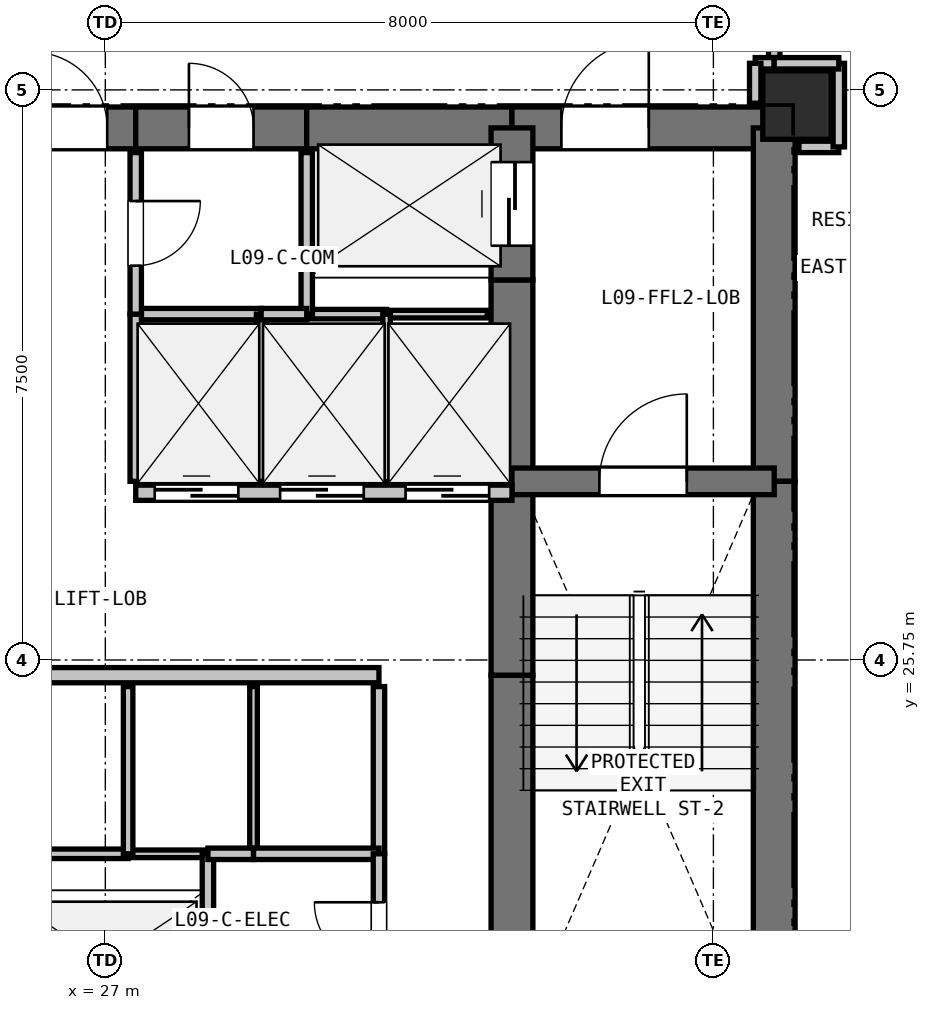
"""IFC4 building model, lengths in metres.
Left out: names, types, materials, properties, quantities, classifications, styles, units other than length and angle.
Written with IfcOpenShell. Run it as: python <this file> out.ifc"""

import sys

from ifc_helpers import new_model, si_unit, direction, frame, frame_2d, origin, origin_2d, place, context, subcontext, project, spatial, rectangle, extrude, element, fill, save


model = new_model("IFC4")
c1 = context("Model", 3, precision=1e-05, world=origin(), true_north=direction((0.0, 1.0)))
c2 = subcontext(c1, "Body", "Model", "MODEL_VIEW")
j1 = project(units=[si_unit("LENGTHUNIT", "METRE"), si_unit("PLANEANGLEUNIT", "RADIAN")], contexts=[c1])
p1 = place(None, origin())
s1 = spatial("IfcSite", under=j1, at=p1, CompositionType="ELEMENT")
p2 = place(p1, origin())
s2 = spatial("IfcBuilding", under=s1, at=p2, CompositionType="ELEMENT")
p3 = place(p2, frame((0.0, 0.0, 35.7)))
s3 = spatial("IfcBuildingStorey", under=s2, at=p3, CompositionType="ELEMENT", Elevation=35.7)
p4 = place(p3, frame((36.1, 33.05, 0.0), z_axis=(0.0, 0.0, 1.0), x_axis=(1.0, 0.0, 0.0)))
e1 = element("IfcColumn", 1, at=p4, inside=s3, PredefinedType="COLUMN", context=c2, shape_type="SweptSolid", body=[
    extrude(rectangle(XDim=0.9, YDim=0.9, at=origin_2d()), origin(), (0.0, 0.0, 1.0), 3.3),
])
p5 = place(p3, frame((25.65, 32.75, 0.0), z_axis=(0.0, 0.0, 1.0), x_axis=(1.0, 0.0, 0.0)))
e2 = element("IfcWall", 2, at=p5, inside=s3, PredefinedType="SHEAR", context=c2, shape_type="SweptSolid", body=[
    extrude(rectangle(XDim=1.75, YDim=0.55, at=frame_2d((0.875, 0.0))), origin(), (0.0, 0.0, 1.0), 3.04),
])
p6 = place(p5, frame((0.375, 0.0, 0.0)))
e3 = element("IfcOpeningElement", 3, at=p6, cuts=e2, PredefinedType="OPENING", context=c2, shape_type="SweptSolid", body=[
    extrude(rectangle(XDim=1.0, YDim=2.15, at=frame_2d((0.5, 1.075))), frame((0.0, 0.285, 0.0), z_axis=(0.0, -1.0, 0.0), x_axis=(1.0, 0.0, 0.0)), (0.0, 0.0, 1.0), 0.57),
])
p7 = place(p3, frame((27.4, 32.75, 0.0), z_axis=(0.0, 0.0, 1.0), x_axis=(1.0, 0.0, 0.0)))
e4 = element("IfcWall", 4, at=p7, inside=s3, PredefinedType="SHEAR", context=c2, shape_type="SweptSolid", body=[
    extrude(rectangle(XDim=2.25, YDim=0.55, at=frame_2d((1.125, 0.0))), origin(), (0.0, 0.0, 1.0), 3.04),
])
p8 = place(p7, frame((0.7, 0.0, 0.0)))
e5 = element("IfcOpeningElement", 5, at=p8, cuts=e4, PredefinedType="OPENING", context=c2, shape_type="SweptSolid", body=[
    extrude(rectangle(XDim=0.85, YDim=2.1, at=frame_2d((0.425, 1.05))), frame((0.0, 0.285, 0.0), z_axis=(0.0, -1.0, 0.0), x_axis=(1.0, 0.0, 0.0)), (0.0, 0.0, 1.0), 0.57),
])
p9 = place(p3, frame((29.65, 32.75, 0.0), z_axis=(0.0, 0.0, 1.0), x_axis=(1.0, 0.0, 0.0)))
e6 = element("IfcWall", 6, at=p9, inside=s3, PredefinedType="SHEAR", context=c2, shape_type="SweptSolid", body=[
    extrude(rectangle(XDim=2.7, YDim=0.55, at=frame_2d((1.35, 0.0))), origin(), (0.0, 0.0, 1.0), 3.04),
])
p10 = place(p3, frame((32.35, 32.75, 0.0), z_axis=(0.0, 0.0, 1.0), x_axis=(1.0, 0.0, 0.0)))
e7 = element("IfcWall", 7, at=p10, inside=s3, PredefinedType="SHEAR", context=c2, shape_type="SweptSolid", body=[
    extrude(rectangle(XDim=3.45, YDim=0.55, at=frame_2d((1.725, 0.0))), origin(), (0.0, 0.0, 1.0), 3.04),
])
p11 = place(p10, frame((0.65, 0.0, 0.0)))
e8 = element("IfcOpeningElement", 8, at=p11, cuts=e7, PredefinedType="OPENING", context=c2, shape_type="SweptSolid", body=[
    extrude(rectangle(XDim=1.15, YDim=2.15, at=frame_2d((0.575, 1.075))), frame((0.0, 0.285, 0.0), z_axis=(0.0, -1.0, 0.0), x_axis=(1.0, 0.0, 0.0)), (0.0, 0.0, 1.0), 0.57),
])
p12 = place(p3, frame((35.8, 32.75, 0.0), z_axis=(0.0, 0.0, 1.0), x_axis=(0.0, -1.0, 0.0)))
e9 = element("IfcWall", 9, at=p12, inside=s3, PredefinedType="SHEAR", context=c2, shape_type="SweptSolid", body=[
    extrude(rectangle(XDim=4.65, YDim=0.55, at=frame_2d((2.325, 0.0))), origin(), (0.0, 0.0, 1.0), 3.04),
])
p13 = place(p3, frame((35.8, 28.1, 0.0), z_axis=(0.0, 0.0, 1.0), x_axis=(0.0, -1.0, 0.0)))
e10 = element("IfcWall", 10, at=p13, inside=s3, PredefinedType="SHEAR", context=c2, shape_type="SweptSolid", body=[
    extrude(rectangle(XDim=7.35, YDim=0.55, at=frame_2d((3.675, 0.0))), origin(), (0.0, 0.0, 1.0), 3.04),
])
p14 = place(p3, frame((32.35, 20.75, 0.0), z_axis=(0.0, 0.0, 1.0), x_axis=(0.0, 1.0, 0.0)))
e11 = element("IfcWall", 11, at=p14, inside=s3, PredefinedType="SHEAR", context=c2, shape_type="SweptSolid", body=[
    extrude(rectangle(XDim=4.8, YDim=0.55, at=frame_2d((2.4, 0.0))), origin(), (0.0, 0.0, 1.0), 3.04),
])
p15 = place(p3, frame((32.35, 25.55, 0.0), z_axis=(0.0, 0.0, 1.0), x_axis=(0.0, 1.0, 0.0)))
e12 = element("IfcWall", 12, at=p15, inside=s3, PredefinedType="SHEAR", context=c2, shape_type="SweptSolid", body=[
    extrude(rectangle(XDim=2.4, YDim=0.55, at=frame_2d((1.2, 0.0))), origin(), (0.0, 0.0, 1.0), 3.04),
])
p16 = place(p3, frame((32.35, 27.95, 0.0), z_axis=(0.0, 0.0, 1.0), x_axis=(0.0, 1.0, 0.0)))
e13 = element("IfcWall", 13, at=p16, inside=s3, PredefinedType="SHEAR", context=c2, shape_type="SweptSolid", body=[
    extrude(rectangle(XDim=2.8, YDim=0.55, at=frame_2d((1.4, 0.0))), origin(), (0.0, 0.0, 1.0), 3.04),
])
p17 = place(p3, frame((32.35, 30.75, 0.0), z_axis=(0.0, 0.0, 1.0), x_axis=(0.0, 1.0, 0.0)))
e14 = element("IfcWall", 14, at=p17, inside=s3, PredefinedType="SHEAR", context=c2, shape_type="SweptSolid", body=[
    extrude(rectangle(XDim=2.0, YDim=0.55, at=frame_2d((1.0, 0.0))), origin(), (0.0, 0.0, 1.0), 3.04),
])
p18 = place(p17, frame((0.45, 0.0, 0.0)))
e15 = element("IfcOpeningElement", 15, at=p18, cuts=e14, PredefinedType="OPENING", context=c2, shape_type="SweptSolid", body=[
    extrude(rectangle(XDim=1.1, YDim=2.15, at=frame_2d((0.55, 1.075))), frame((0.0, 0.285, 0.0), z_axis=(0.0, -1.0, 0.0), x_axis=(1.0, 0.0, 0.0)), (0.0, 0.0, 1.0), 0.57),
])
p19 = place(p3, frame((32.35, 28.1, 0.0), z_axis=(0.0, 0.0, 1.0), x_axis=(1.0, 0.0, 0.0)))
e16 = element("IfcWall", 16, at=p19, inside=s3, PredefinedType="SHEAR", context=c2, shape_type="SweptSolid", body=[
    extrude(rectangle(XDim=3.45, YDim=0.35, at=frame_2d((1.725, 0.0))), origin(), (0.0, 0.0, 1.0), 3.04),
])
p20 = place(p19, frame((1.15, 0.0, 0.0)))
e17 = element("IfcOpeningElement", 17, at=p20, cuts=e16, PredefinedType="OPENING", context=c2, shape_type="SweptSolid", body=[
    extrude(rectangle(XDim=1.15, YDim=2.15, at=frame_2d((0.575, 1.075))), frame((0.0, 0.185, 0.0), z_axis=(0.0, -1.0, 0.0), x_axis=(1.0, 0.0, 0.0)), (0.0, 0.0, 1.0), 0.37),
])
p21 = place(p3, frame((25.65, 25.55, 0.0), z_axis=(0.0, 0.0, 1.0), x_axis=(1.0, 0.0, 0.0)))
e18 = element("IfcWall", 18, at=p21, inside=s3, PredefinedType="PARTITIONING", context=c2, shape_type="SweptSolid", body=[
    extrude(rectangle(XDim=4.95, YDim=0.2, at=frame_2d((2.475, 0.0))), origin(), (0.0, 0.0, 1.0), 3.04),
])
p22 = place(p3, frame((27.4, 27.95, 0.0), z_axis=(0.0, 0.0, 1.0), x_axis=(1.0, 0.0, 0.0)))
e19 = element("IfcWall", 19, at=p22, inside=s3, PredefinedType="PARTITIONING", context=c2, shape_type="SweptSolid", body=[
    extrude(rectangle(XDim=4.95, YDim=0.2, at=frame_2d((2.475, 0.0))), origin(), (0.0, 0.0, 1.0), 3.04),
])
p23 = place(p22, frame((0.25, 0.0, 0.0)))
e20 = element("IfcOpeningElement", 20, at=p23, cuts=e19, PredefinedType="OPENING", context=c2, shape_type="SweptSolid", body=[
    extrude(rectangle(XDim=1.1, YDim=2.15, at=frame_2d((0.55, 1.075))), frame((0.0, 0.11, 0.0), z_axis=(0.0, -1.0, 0.0), x_axis=(1.0, 0.0, 0.0)), (0.0, 0.0, 1.0), 0.22),
])
p24 = place(p22, frame((1.9, 0.0, 0.0)))
e21 = element("IfcOpeningElement", 21, at=p24, cuts=e19, PredefinedType="OPENING", context=c2, shape_type="SweptSolid", body=[
    extrude(rectangle(XDim=1.1, YDim=2.15, at=frame_2d((0.55, 1.075))), frame((0.0, 0.11, 0.0), z_axis=(0.0, -1.0, 0.0), x_axis=(1.0, 0.0, 0.0)), (0.0, 0.0, 1.0), 0.22),
])
p25 = place(p22, frame((3.55, 0.0, 0.0)))
e22 = element("IfcOpeningElement", 22, at=p25, cuts=e19, PredefinedType="OPENING", context=c2, shape_type="SweptSolid", body=[
    extrude(rectangle(XDim=1.1, YDim=2.15, at=frame_2d((0.55, 1.075))), frame((0.0, 0.11, 0.0), z_axis=(0.0, -1.0, 0.0), x_axis=(1.0, 0.0, 0.0)), (0.0, 0.0, 1.0), 0.22),
])
p26 = place(p3, frame((25.975, 23.2, 0.0), z_axis=(0.0, 0.0, 1.0), x_axis=(1.0, 0.0, 0.0)))
e23 = element("IfcWall", 23, at=p26, inside=s3, PredefinedType="PARTITIONING", context=c2, shape_type="SweptSolid", body=[
    extrude(rectangle(XDim=1.325, YDim=0.125, at=frame_2d((0.663, 0.0))), origin(), (0.0, 0.0, 1.0), 3.04),
])
p27 = place(p3, frame((27.3, 23.2, 0.0), z_axis=(0.0, 0.0, 1.0), x_axis=(1.0, 0.0, 0.0)))
e24 = element("IfcWall", 24, at=p27, inside=s3, PredefinedType="PARTITIONING", context=c2, shape_type="SweptSolid", body=[
    extrude(rectangle(XDim=1.05, YDim=0.1, at=frame_2d((0.525, 0.0))), origin(), (0.0, 0.0, 1.0), 3.04),
])
p28 = place(p3, frame((28.35, 23.2, 0.0), z_axis=(0.0, 0.0, 1.0), x_axis=(0.0, -1.0, 0.0)))
e25 = element("IfcWall", 25, at=p28, inside=s3, PredefinedType="PARTITIONING", context=c2, shape_type="SweptSolid", body=[
    extrude(rectangle(XDim=2.125, YDim=0.15, at=frame_2d((1.062, 0.0))), origin(), (0.0, 0.0, 1.0), 3.04),
])
p29 = place(p3, frame((32.025, 30.3, 0.0), z_axis=(0.0, 0.0, 1.0), x_axis=(-1.0, 0.0, 0.0)))
e26 = element("IfcWall", 26, at=p29, inside=s3, PredefinedType="PARTITIONING", context=c2, shape_type="SweptSolid", body=[
    extrude(rectangle(XDim=1.325, YDim=0.1, at=frame_2d((0.663, 0.0))), origin(), (0.0, 0.0, 1.0), 3.04),
])
p30 = place(p3, frame((30.7, 30.3, 0.0), z_axis=(0.0, 0.0, 1.0), x_axis=(-1.0, 0.0, 0.0)))
e27 = element("IfcWall", 27, at=p30, inside=s3, PredefinedType="PARTITIONING", context=c2, shape_type="SweptSolid", body=[
    extrude(rectangle(XDim=1.05, YDim=0.125, at=frame_2d((0.525, 0.0))), origin(), (0.0, 0.0, 1.0), 3.04),
])
p31 = place(p3, frame((29.65, 30.3, 0.0), z_axis=(0.0, 0.0, 1.0), x_axis=(0.0, 1.0, 0.0)))
e28 = element("IfcWall", 28, at=p31, inside=s3, PredefinedType="PARTITIONING", context=c2, shape_type="SweptSolid", body=[
    extrude(rectangle(XDim=2.125, YDim=0.15, at=frame_2d((1.062, 0.0))), origin(), (0.0, 0.0, 1.0), 3.04),
])
p32 = place(p3, frame((27.3, 25.4, 0.0), z_axis=(0.0, 0.0, 1.0), x_axis=(0.0, -1.0, 0.0)))
e29 = element("IfcWall", 29, at=p32, inside=s3, PredefinedType="PARTITIONING", context=c2, shape_type="SweptSolid", body=[
    extrude(rectangle(XDim=2.2, YDim=0.125, at=frame_2d((1.1, 0.0))), origin(), (0.0, 0.0, 1.0), 3.04),
])
p33 = place(p3, frame((28.95, 25.4, 0.0), z_axis=(0.0, 0.0, 1.0), x_axis=(0.0, -1.0, 0.0)))
e30 = element("IfcWall", 30, at=p33, inside=s3, PredefinedType="PARTITIONING", context=c2, shape_type="SweptSolid", body=[
    extrude(rectangle(XDim=2.2, YDim=0.1, at=frame_2d((1.1, 0.0))), origin(), (0.0, 0.0, 1.0), 3.04),
])
p34 = place(p3, frame((28.95, 23.2, 0.0), z_axis=(0.0, 0.0, 1.0), x_axis=(-1.0, 0.0, 0.0)))
e31 = element("IfcWall", 31, at=p34, inside=s3, PredefinedType="PARTITIONING", context=c2, shape_type="SweptSolid", body=[
    extrude(rectangle(XDim=0.6, YDim=0.15, at=frame_2d((0.3, 0.0))), origin(), (0.0, 0.0, 1.0), 3.04),
])
p35 = place(p3, frame((30.6, 25.4, 0.0), z_axis=(0.0, 0.0, 1.0), x_axis=(0.0, -1.0, 0.0)))
e32 = element("IfcWall", 32, at=p35, inside=s3, PredefinedType="PARTITIONING", context=c2, shape_type="SweptSolid", body=[
    extrude(rectangle(XDim=2.2, YDim=0.15, at=frame_2d((1.1, 0.0))), origin(), (0.0, 0.0, 1.0), 3.04),
])
for number, where, z_axis, x_axis in (
    (33, (30.6, 23.2, 0.0), (0.0, 0.0, 1.0), (-1.0, 0.0, 0.0)),
    (34, (27.4, 30.3, 0.0), (0.0, 0.0, 1.0), (1.0, 0.0, 0.0)),
):
    element("IfcWall", number, at=place(p3, frame(where, z_axis=z_axis, x_axis=x_axis)), inside=s3, PredefinedType="PARTITIONING", context=c2, shape_type="SweptSolid", body=[
        extrude(rectangle(XDim=1.65, YDim=0.15, at=frame_2d((0.825, 0.0))), origin(), (0.0, 0.0, 1.0), 3.04),
    ])
p36 = place(p3, frame((29.05, 30.3, 0.0), z_axis=(0.0, 0.0, 1.0), x_axis=(0.0, -1.0, 0.0)))
e35 = element("IfcWall", 35, at=p36, inside=s3, PredefinedType="PARTITIONING", context=c2, shape_type="SweptSolid", body=[
    extrude(rectangle(XDim=2.2, YDim=0.125, at=frame_2d((1.1, 0.0))), origin(), (0.0, 0.0, 1.0), 3.04),
])
p37 = place(p3, frame((27.4, 28.1, 0.0), z_axis=(0.0, 0.0, 1.0), x_axis=(0.0, 1.0, 0.0)))
e36 = element("IfcWall", 36, at=p37, inside=s3, PredefinedType="PARTITIONING", context=c2, shape_type="SweptSolid", body=[
    extrude(rectangle(XDim=2.2, YDim=0.15, at=frame_2d((1.1, 0.0))), origin(), (0.0, 0.0, 1.0), 3.04),
])
p38 = place(p3, frame((29.05, 30.3, 0.0), z_axis=(0.0, 0.0, 1.0), x_axis=(1.0, 0.0, 0.0)))
e37 = element("IfcWall", 37, at=p38, inside=s3, PredefinedType="PARTITIONING", context=c2, shape_type="SweptSolid", body=[
    extrude(rectangle(XDim=0.6, YDim=0.15, at=frame_2d((0.3, 0.0))), origin(), (0.0, 0.0, 1.0), 3.04),
])
p39 = place(p3, frame((30.7, 30.3, 0.0), z_axis=(0.0, 0.0, 1.0), x_axis=(0.0, -1.0, 0.0)))
e38 = element("IfcWall", 38, at=p39, inside=s3, PredefinedType="PARTITIONING", context=c2, shape_type="SweptSolid", body=[
    extrude(rectangle(XDim=2.2, YDim=0.1, at=frame_2d((1.1, 0.0))), origin(), (0.0, 0.0, 1.0), 3.04),
])
p40 = place(p3, frame((30.6, 21.075, 0.0), z_axis=(0.0, 0.0, 1.0), x_axis=(0.0, 1.0, 0.0)))
e39 = element("IfcWall", 39, at=p40, inside=s3, PredefinedType="PARTITIONING", context=c2, shape_type="SweptSolid", body=[
    extrude(rectangle(XDim=2.125, YDim=0.15, at=frame_2d((1.062, 0.0))), origin(), (0.0, 0.0, 1.0), 3.04),
])
p41 = place(p40, frame((0.637, 0.0, 0.0)))
e40 = element("IfcOpeningElement", 40, at=p41, cuts=e39, PredefinedType="OPENING", context=c2, shape_type="SweptSolid", body=[
    extrude(rectangle(XDim=0.85, YDim=2.1, at=frame_2d((0.425, 1.05))), frame((0.0, 0.085, 0.0), z_axis=(0.0, -1.0, 0.0), x_axis=(1.0, 0.0, 0.0)), (0.0, 0.0, 1.0), 0.17),
])
p42 = place(p3, frame((27.4, 32.425, 0.0), z_axis=(0.0, 0.0, 1.0), x_axis=(0.0, -1.0, 0.0)))
e41 = element("IfcWall", 41, at=p42, inside=s3, PredefinedType="PARTITIONING", context=c2, shape_type="SweptSolid", body=[
    extrude(rectangle(XDim=2.125, YDim=0.15, at=frame_2d((1.062, 0.0))), origin(), (0.0, 0.0, 1.0), 3.04),
])
p43 = place(p42, frame((0.637, 0.0, 0.0)))
e42 = element("IfcOpeningElement", 42, at=p43, cuts=e41, PredefinedType="OPENING", context=c2, shape_type="SweptSolid", body=[
    extrude(rectangle(XDim=0.85, YDim=2.1, at=frame_2d((0.425, 1.05))), frame((0.0, 0.085, 0.0), z_axis=(0.0, -1.0, 0.0), x_axis=(1.0, 0.0, 0.0)), (0.0, 0.0, 1.0), 0.17),
])
p44 = place(p3, frame((35.8, 35.35, 0.0), z_axis=(0.0, 0.0, 1.0), x_axis=(0.0, -1.0, 0.0)))
e43 = element("IfcWall", 43, at=p44, inside=s3, PredefinedType="PARTITIONING", context=c2, shape_type="SweptSolid", body=[
    extrude(rectangle(XDim=1.75, YDim=0.15, at=frame_2d((0.875, 0.0))), origin(), (0.0, 0.0, 1.0), 3.04),
])
p45 = place(p44, frame((0.375, 0.0, 0.0)))
e44 = element("IfcOpeningElement", 44, at=p45, cuts=e43, PredefinedType="OPENING", context=c2, shape_type="SweptSolid", body=[
    extrude(rectangle(XDim=1.0, YDim=2.15, at=frame_2d((0.5, 1.075))), frame((0.0, 0.085, 0.0), z_axis=(0.0, -1.0, 0.0), x_axis=(1.0, 0.0, 0.0)), (0.0, 0.0, 1.0), 0.17),
])
p46 = place(p3, frame((35.8, 33.6, 0.0), z_axis=(0.0, 0.0, 1.0), x_axis=(-1.0, 0.0, 0.0)))
e45 = element("IfcWall", 45, at=p46, inside=s3, PredefinedType="PARTITIONING", context=c2, shape_type="SweptSolid", body=[
    extrude(rectangle(XDim=0.25, YDim=0.15, at=frame_2d((0.125, 0.0))), origin(), (0.0, 0.0, 1.0), 3.04),
])
p47 = place(p3, frame((35.55, 33.6, 0.0), z_axis=(0.0, 0.0, 1.0), x_axis=(0.0, -1.0, 0.0)))
e46 = element("IfcWall", 46, at=p47, inside=s3, PredefinedType="PARTITIONING", context=c2, shape_type="SweptSolid", body=[
    extrude(rectangle(XDim=0.525, YDim=0.15, at=frame_2d((0.263, 0.0))), origin(), (0.0, 0.0, 1.0), 2.488),
])
p48 = place(p3, frame((36.125, 32.5, 0.0), z_axis=(0.0, 0.0, 1.0), x_axis=(1.0, 0.0, 0.0)))
e47 = element("IfcWall", 47, at=p48, inside=s3, PredefinedType="PARTITIONING", context=c2, shape_type="SweptSolid", body=[
    extrude(rectangle(XDim=0.525, YDim=0.15, at=frame_2d((0.262, 0.0))), origin(), (0.0, 0.0, 1.0), 2.488),
])
p49 = place(p3, frame((36.65, 32.5, 0.0), z_axis=(0.0, 0.0, 1.0), x_axis=(0.0, 1.0, 0.0)))
e48 = element("IfcWall", 48, at=p49, inside=s3, PredefinedType="PARTITIONING", context=c2, shape_type="SweptSolid", body=[
    extrude(rectangle(XDim=1.1, YDim=0.15, at=frame_2d((0.55, 0.0))), origin(), (0.0, 0.0, 1.0), 2.338),
])
p50 = place(p3, frame((36.65, 33.6, 0.0), z_axis=(0.0, 0.0, 1.0), x_axis=(-1.0, 0.0, 0.0)))
e49 = element("IfcWall", 49, at=p50, inside=s3, PredefinedType="PARTITIONING", context=c2, shape_type="SweptSolid", body=[
    extrude(rectangle(XDim=0.85, YDim=0.15, at=frame_2d((0.425, 0.0))), origin(), (0.0, 0.0, 1.0), 2.338),
])
p51 = place(p23, origin())
e50 = element("IfcDoor", 50, at=p51, inside=s3, OperationType="SLIDING_TO_LEFT", PredefinedType="DOOR", context=c2, shape_type="SweptSolid", body=[
    extrude(rectangle(XDim=1.1, YDim=2.15, at=frame_2d((0.55, 1.075))), frame((0.0, 0.025, 0.0), z_axis=(0.0, -1.0, 0.0), x_axis=(1.0, 0.0, 0.0)), (0.0, 0.0, 1.0), 0.05),
])
fill(e20, e50)
p52 = place(p24, origin())
e51 = element("IfcDoor", 51, at=p52, inside=s3, OperationType="SLIDING_TO_LEFT", PredefinedType="DOOR", context=c2, shape_type="SweptSolid", body=[
    extrude(rectangle(XDim=1.1, YDim=2.15, at=frame_2d((0.55, 1.075))), frame((0.0, 0.025, 0.0), z_axis=(0.0, -1.0, 0.0), x_axis=(1.0, 0.0, 0.0)), (0.0, 0.0, 1.0), 0.05),
])
fill(e21, e51)
p53 = place(p25, origin())
e52 = element("IfcDoor", 52, at=p53, inside=s3, OperationType="SLIDING_TO_LEFT", PredefinedType="DOOR", context=c2, shape_type="SweptSolid", body=[
    extrude(rectangle(XDim=1.1, YDim=2.15, at=frame_2d((0.55, 1.075))), frame((0.0, 0.025, 0.0), z_axis=(0.0, -1.0, 0.0), x_axis=(1.0, 0.0, 0.0)), (0.0, 0.0, 1.0), 0.05),
])
fill(e22, e52)
p54 = place(p6, origin())
e53 = element("IfcDoor", 53, at=p54, inside=s3, OperationType="SINGLE_SWING_LEFT", PredefinedType="DOOR", context=c2, shape_type="SweptSolid", body=[
    extrude(rectangle(XDim=1.0, YDim=2.15, at=frame_2d((0.5, 1.075))), frame((0.0, 0.025, 0.0), z_axis=(0.0, -1.0, 0.0), x_axis=(1.0, 0.0, 0.0)), (0.0, 0.0, 1.0), 0.05),
])
fill(e3, e53)
p55 = place(p18, origin())
e54 = element("IfcDoor", 54, at=p55, inside=s3, OperationType="SLIDING_TO_LEFT", PredefinedType="DOOR", context=c2, shape_type="SweptSolid", body=[
    extrude(rectangle(XDim=1.1, YDim=2.15, at=frame_2d((0.55, 1.075))), frame((0.0, 0.025, 0.0), z_axis=(0.0, -1.0, 0.0), x_axis=(1.0, 0.0, 0.0)), (0.0, 0.0, 1.0), 0.05),
])
fill(e15, e54)
p56 = place(p20, origin())
e55 = element("IfcDoor", 55, at=p56, inside=s3, OperationType="SINGLE_SWING_RIGHT", PredefinedType="DOOR", context=c2, shape_type="SweptSolid", body=[
    extrude(rectangle(XDim=1.15, YDim=2.15, at=frame_2d((0.575, 1.075))), frame((0.0, 0.025, 0.0), z_axis=(0.0, -1.0, 0.0), x_axis=(1.0, 0.0, 0.0)), (0.0, 0.0, 1.0), 0.05),
])
fill(e17, e55)
p57 = place(p11, origin())
e56 = element("IfcDoor", 56, at=p57, inside=s3, OperationType="SINGLE_SWING_RIGHT", PredefinedType="DOOR", context=c2, shape_type="SweptSolid", body=[
    extrude(rectangle(XDim=1.15, YDim=2.15, at=frame_2d((0.575, 1.075))), frame((0.0, 0.025, 0.0), z_axis=(0.0, -1.0, 0.0), x_axis=(1.0, 0.0, 0.0)), (0.0, 0.0, 1.0), 0.05),
])
fill(e8, e56)
p58 = place(p41, origin())
e57 = element("IfcDoor", 57, at=p58, inside=s3, OperationType="SINGLE_SWING_RIGHT", PredefinedType="DOOR", context=c2, shape_type="SweptSolid", body=[
    extrude(rectangle(XDim=0.85, YDim=2.1, at=frame_2d((0.425, 1.05))), frame((0.0, 0.025, 0.0), z_axis=(0.0, -1.0, 0.0), x_axis=(1.0, 0.0, 0.0)), (0.0, 0.0, 1.0), 0.05),
])
fill(e40, e57)
p59 = place(p43, origin())
e58 = element("IfcDoor", 58, at=p59, inside=s3, OperationType="SINGLE_SWING_LEFT", PredefinedType="DOOR", context=c2, shape_type="SweptSolid", body=[
    extrude(rectangle(XDim=0.85, YDim=2.1, at=frame_2d((0.425, 1.05))), frame((0.0, 0.025, 0.0), z_axis=(0.0, -1.0, 0.0), x_axis=(1.0, 0.0, 0.0)), (0.0, 0.0, 1.0), 0.05),
])
fill(e42, e58)
p60 = place(p8, origin())
e59 = element("IfcDoor", 59, at=p60, inside=s3, OperationType="SINGLE_SWING_LEFT", PredefinedType="DOOR", context=c2, shape_type="SweptSolid", body=[
    extrude(rectangle(XDim=0.85, YDim=2.1, at=frame_2d((0.425, 1.05))), frame((0.0, 0.025, 0.0), z_axis=(0.0, -1.0, 0.0), x_axis=(1.0, 0.0, 0.0)), (0.0, 0.0, 1.0), 0.05),
])
fill(e5, e59)
save(model, sys.argv[1])
